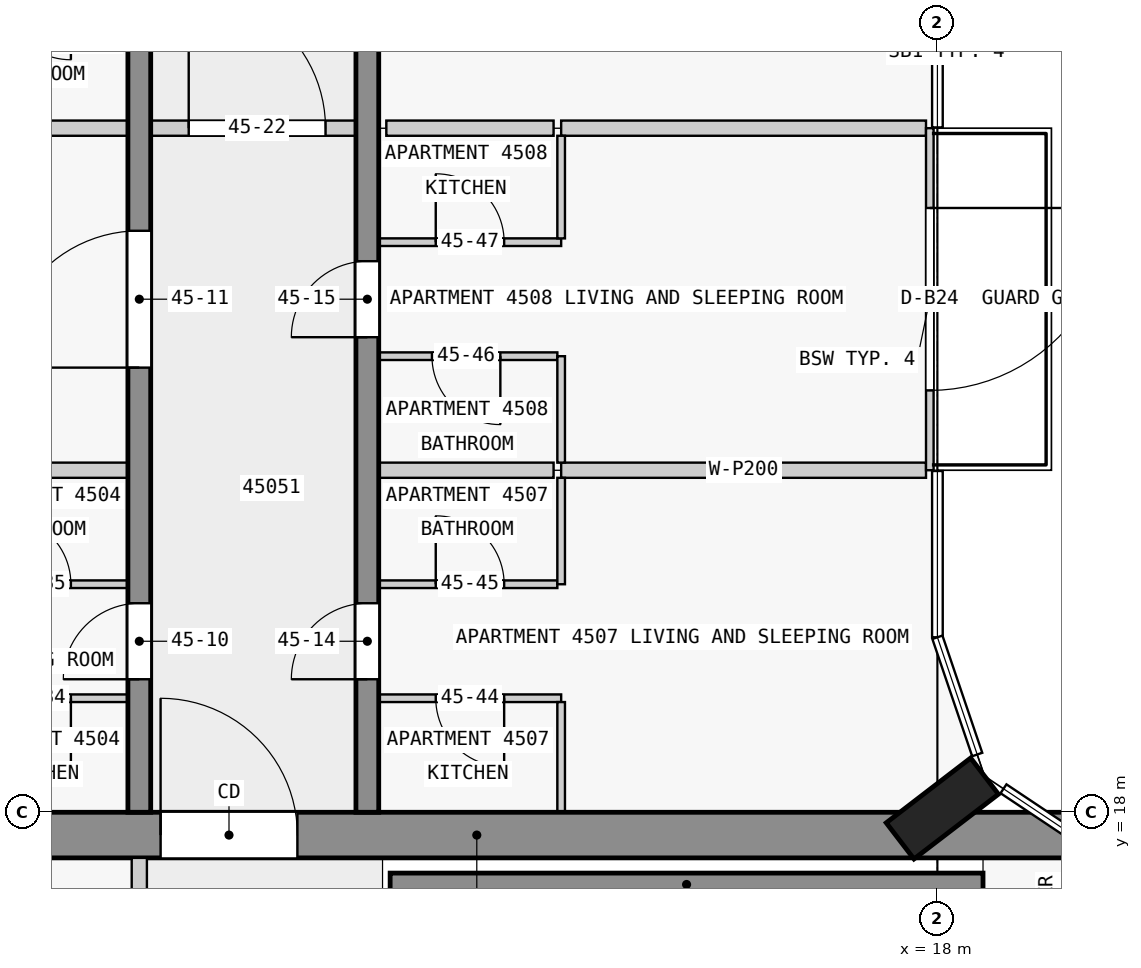
"""IFC4 building model, lengths in metres.
Left out: names, types, materials, properties, quantities, classifications, styles, units other than length and angle.
Written with IfcOpenShell. Run it as: python <this file> out.ifc"""

import sys

from ifc_helpers import new_model, si_unit, direction, frame, frame_2d, origin, origin_2d, place, context, subcontext, project, spatial, rectangle, extrude, element, fill, save


model = new_model("IFC4")
c1 = context("Model", 3, precision=1e-05, world=origin(), true_north=direction((0.0, 1.0)))
c2 = subcontext(c1, "Body", "Model", "MODEL_VIEW")
j1 = project(units=[si_unit("LENGTHUNIT", "METRE"), si_unit("PLANEANGLEUNIT", "RADIAN")], contexts=[c1])
p1 = place(None, origin())
s1 = spatial("IfcSite", under=j1, at=p1, CompositionType="ELEMENT")
p2 = place(p1, origin())
s2 = spatial("IfcBuilding", under=s1, at=p2, CompositionType="ELEMENT")
p3 = place(p2, frame((0.0, 0.0, 174.4)))
s3 = spatial("IfcBuildingStorey", under=s2, at=p3, CompositionType="ELEMENT", Elevation=174.4)
p4 = place(p3, frame((18.065, 18.05, 0.0), z_axis=(0.0, 0.0, 1.0), x_axis=(-0.608810846443, 0.793315418515, 0.0)))
e1 = element("IfcColumn", 1, at=p4, inside=s3, PredefinedType="COLUMN", context=c2, shape_type="SweptSolid", body=[
    extrude(rectangle(XDim=0.6, YDim=1.4, at=origin_2d()), origin(), (0.0, 0.0, 1.0), 3.5),
])
p5 = place(p3, frame((1.38, 17.7, 0.0), z_axis=(0.0, 0.0, 1.0), x_axis=(1.0, 0.0, 0.0)))
e2 = element("IfcWall", 2, at=p5, inside=s3, PredefinedType="SHEAR", context=c2, shape_type="SweptSolid", body=[
    extrude(rectangle(XDim=21.12, YDim=0.6, at=frame_2d((10.56, 0.0))), origin(), (0.0, 0.0, 1.0), 3.25),
])
p6 = place(p5, frame((6.4, 0.0, 0.0)))
e3 = element("IfcOpeningElement", 3, at=p6, cuts=e2, PredefinedType="OPENING", context=c2, shape_type="SweptSolid", body=[
    extrude(rectangle(XDim=1.8, YDim=2.1, at=frame_2d((0.9, 1.05))), frame((0.0, 0.31, 0.0), z_axis=(0.0, -1.0, 0.0), x_axis=(1.0, 0.0, 0.0)), (0.0, 0.0, 1.0), 0.62),
])
p7 = place(p3, frame((10.8, 17.05, 0.0), z_axis=(0.0, 0.0, 1.0), x_axis=(1.0, 0.0, 0.0)))
e4 = element("IfcWall", 4, at=p7, inside=s3, PredefinedType="SHEAR", context=c2, shape_type="SweptSolid", body=[
    extrude(rectangle(XDim=7.8, YDim=0.3, at=frame_2d((3.9, 0.0))), origin(), (0.0, 0.0, 1.0), 3.25),
])
p8 = place(p3, frame((7.5, 18.0, 0.0), z_axis=(0.0, 0.0, 1.0), x_axis=(0.0, 1.0, 0.0)))
e5 = element("IfcWall", 5, at=p8, inside=s3, PredefinedType="SHEAR", context=c2, shape_type="SweptSolid", body=[
    extrude(rectangle(XDim=27.0, YDim=0.3, at=frame_2d((13.5, 0.0))), origin(), (0.0, 0.0, 1.0), 3.25),
])
p9 = place(p8, frame((1.75, 0.0, 0.0)))
e6 = element("IfcOpeningElement", 6, at=p9, cuts=e5, PredefinedType="OPENING", context=c2, shape_type="SweptSolid", body=[
    extrude(rectangle(XDim=1.0, YDim=2.1, at=frame_2d((0.5, 1.05))), frame((0.0, 0.16, 0.0), z_axis=(0.0, -1.0, 0.0), x_axis=(1.0, 0.0, 0.0)), (0.0, 0.0, 1.0), 0.32),
])
p10 = place(p8, frame((5.85, 0.0, 0.0)))
e7 = element("IfcOpeningElement", 7, at=p10, cuts=e5, PredefinedType="OPENING", context=c2, shape_type="SweptSolid", body=[
    extrude(rectangle(XDim=1.8, YDim=2.1, at=frame_2d((0.9, 1.05))), frame((0.0, 0.16, 0.0), z_axis=(0.0, -1.0, 0.0), x_axis=(1.0, 0.0, 0.0)), (0.0, 0.0, 1.0), 0.32),
])
p11 = place(p8, frame((13.05, 0.0, 0.0)))
e8 = element("IfcOpeningElement", 8, at=p11, cuts=e5, PredefinedType="OPENING", context=c2, shape_type="SweptSolid", body=[
    extrude(rectangle(XDim=1.0, YDim=2.1, at=frame_2d((0.5, 1.05))), frame((0.0, 0.16, 0.0), z_axis=(0.0, -1.0, 0.0), x_axis=(1.0, 0.0, 0.0)), (0.0, 0.0, 1.0), 0.32),
])
p12 = place(p8, frame((21.35, 0.0, 0.0)))
e9 = element("IfcOpeningElement", 9, at=p12, cuts=e5, PredefinedType="OPENING", context=c2, shape_type="SweptSolid", body=[
    extrude(rectangle(XDim=1.0, YDim=2.1, at=frame_2d((0.5, 1.05))), frame((0.0, 0.16, 0.0), z_axis=(0.0, -1.0, 0.0), x_axis=(1.0, 0.0, 0.0)), (0.0, 0.0, 1.0), 0.32),
])
p13 = place(p3, frame((10.5, 18.0, 0.0), z_axis=(0.0, 0.0, 1.0), x_axis=(0.0, 1.0, 0.0)))
e10 = element("IfcWall", 10, at=p13, inside=s3, PredefinedType="SHEAR", context=c2, shape_type="SweptSolid", body=[
    extrude(rectangle(XDim=27.0, YDim=0.3, at=frame_2d((13.5, 0.0))), origin(), (0.0, 0.0, 1.0), 3.25),
])
p14 = place(p13, frame((1.75, 0.0, 0.0)))
e11 = element("IfcOpeningElement", 11, at=p14, cuts=e10, PredefinedType="OPENING", context=c2, shape_type="SweptSolid", body=[
    extrude(rectangle(XDim=1.0, YDim=2.1, at=frame_2d((0.5, 1.05))), frame((0.0, 0.16, 0.0), z_axis=(0.0, -1.0, 0.0), x_axis=(1.0, 0.0, 0.0)), (0.0, 0.0, 1.0), 0.32),
])
p15 = place(p13, frame((6.25, 0.0, 0.0)))
e12 = element("IfcOpeningElement", 12, at=p15, cuts=e10, PredefinedType="OPENING", context=c2, shape_type="SweptSolid", body=[
    extrude(rectangle(XDim=1.0, YDim=2.1, at=frame_2d((0.5, 1.05))), frame((0.0, 0.16, 0.0), z_axis=(0.0, -1.0, 0.0), x_axis=(1.0, 0.0, 0.0)), (0.0, 0.0, 1.0), 0.32),
])
p16 = place(p13, frame((10.75, 0.0, 0.0)))
e13 = element("IfcOpeningElement", 13, at=p16, cuts=e10, PredefinedType="OPENING", context=c2, shape_type="SweptSolid", body=[
    extrude(rectangle(XDim=1.0, YDim=2.1, at=frame_2d((0.5, 1.05))), frame((0.0, 0.16, 0.0), z_axis=(0.0, -1.0, 0.0), x_axis=(1.0, 0.0, 0.0)), (0.0, 0.0, 1.0), 0.32),
])
p17 = place(p13, frame((15.25, 0.0, 0.0)))
e14 = element("IfcOpeningElement", 14, at=p17, cuts=e10, PredefinedType="OPENING", context=c2, shape_type="SweptSolid", body=[
    extrude(rectangle(XDim=1.0, YDim=2.1, at=frame_2d((0.5, 1.05))), frame((0.0, 0.16, 0.0), z_axis=(0.0, -1.0, 0.0), x_axis=(1.0, 0.0, 0.0)), (0.0, 0.0, 1.0), 0.32),
])
p18 = place(p13, frame((19.75, 0.0, 0.0)))
e15 = element("IfcOpeningElement", 15, at=p18, cuts=e10, PredefinedType="OPENING", context=c2, shape_type="SweptSolid", body=[
    extrude(rectangle(XDim=1.0, YDim=2.1, at=frame_2d((0.5, 1.05))), frame((0.0, 0.16, 0.0), z_axis=(0.0, -1.0, 0.0), x_axis=(1.0, 0.0, 0.0)), (0.0, 0.0, 1.0), 0.32),
])
p19 = place(p13, frame((23.25, 0.0, 0.0)))
e16 = element("IfcOpeningElement", 16, at=p19, cuts=e10, PredefinedType="OPENING", context=c2, shape_type="SweptSolid", body=[
    extrude(rectangle(XDim=0.9, YDim=2.1, at=frame_2d((0.45, 1.05))), frame((0.0, 0.16, 0.0), z_axis=(0.0, -1.0, 0.0), x_axis=(1.0, 0.0, 0.0)), (0.0, 0.0, 1.0), 0.32),
])
p20 = place(p13, frame((25.45, 0.0, 0.0)))
e17 = element("IfcOpeningElement", 17, at=p20, cuts=e10, PredefinedType="OPENING", context=c2, shape_type="SweptSolid", body=[
    extrude(rectangle(XDim=1.0, YDim=2.1, at=frame_2d((0.5, 1.05))), frame((0.0, 0.16, 0.0), z_axis=(0.0, -1.0, 0.0), x_axis=(1.0, 0.0, 0.0)), (0.0, 0.0, 1.0), 0.32),
])
p21 = place(p3, frame((17.9, 27.0, 0.0), z_axis=(0.0, 0.0, 1.0), x_axis=(0.0, -1.0, 0.0)))
e18 = element("IfcWall", 18, at=p21, inside=s3, PredefinedType="STANDARD", context=c2, shape_type="SweptSolid", body=[
    extrude(rectangle(XDim=4.5, YDim=0.1, at=frame_2d((2.25, 0.0))), origin(), (0.0, 0.0, 1.0), 3.25),
])
p22 = place(p21, frame((1.05, 0.0, 0.0)))
e19 = element("IfcOpeningElement", 19, at=p22, cuts=e18, PredefinedType="OPENING", context=c2, shape_type="SweptSolid", body=[
    extrude(rectangle(XDim=2.4, YDim=2.4, at=frame_2d((1.2, 1.2))), frame((0.0, 0.06, 0.0), z_axis=(0.0, -1.0, 0.0), x_axis=(1.0, 0.0, 0.0)), (0.0, 0.0, 1.0), 0.12),
])
p23 = place(p3, frame((7.5, 10.1, 0.0), z_axis=(0.0, 0.0, 1.0), x_axis=(0.0, 1.0, 0.0)))
e20 = element("IfcWall", 20, at=p23, inside=s3, PredefinedType="PARTITIONING", context=c2, shape_type="SweptSolid", body=[
    extrude(rectangle(XDim=7.3, YDim=0.2, at=frame_2d((3.65, 0.0))), origin(), (0.0, 0.0, 1.0), 3.25),
])
p24 = place(p23, frame((0.775, 0.0, 0.0)))
e21 = element("IfcOpeningElement", 21, at=p24, cuts=e20, PredefinedType="OPENING", context=c2, shape_type="SweptSolid", body=[
    extrude(rectangle(XDim=0.9, YDim=2.1, at=frame_2d((0.45, 1.05))), frame((0.0, 0.11, 0.0), z_axis=(0.0, -1.0, 0.0), x_axis=(1.0, 0.0, 0.0)), (0.0, 0.0, 1.0), 0.22),
])
p25 = place(p23, frame((3.225, 0.0, 0.0)))
e22 = element("IfcOpeningElement", 22, at=p25, cuts=e20, PredefinedType="OPENING", context=c2, shape_type="SweptSolid", body=[
    extrude(rectangle(XDim=0.9, YDim=2.1, at=frame_2d((0.45, 1.05))), frame((0.0, 0.11, 0.0), z_axis=(0.0, -1.0, 0.0), x_axis=(1.0, 0.0, 0.0)), (0.0, 0.0, 1.0), 0.22),
])
p26 = place(p23, frame((5.25, 0.0, 0.0)))
e23 = element("IfcOpeningElement", 23, at=p26, cuts=e20, PredefinedType="OPENING", context=c2, shape_type="SweptSolid", body=[
    extrude(rectangle(XDim=0.9, YDim=2.1, at=frame_2d((0.45, 1.05))), frame((0.0, 0.11, 0.0), z_axis=(0.0, -1.0, 0.0), x_axis=(1.0, 0.0, 0.0)), (0.0, 0.0, 1.0), 0.22),
])
p27 = place(p3, frame((7.35, 19.5, 0.0), z_axis=(0.0, 0.0, 1.0), x_axis=(-1.0, 0.0, 0.0)))
e24 = element("IfcWall", 24, at=p27, inside=s3, PredefinedType="PARTITIONING", context=c2, shape_type="SweptSolid", body=[
    extrude(rectangle(XDim=2.4, YDim=0.1, at=frame_2d((1.2, 0.0))), origin(), (0.0, 0.0, 1.0), 3.25),
])
p28 = place(p27, frame((0.75, 0.0, 0.0)))
e25 = element("IfcOpeningElement", 25, at=p28, cuts=e24, PredefinedType="OPENING", context=c2, shape_type="SweptSolid", body=[
    extrude(rectangle(XDim=0.9, YDim=2.1, at=frame_2d((0.45, 1.05))), frame((0.0, 0.06, 0.0), z_axis=(0.0, -1.0, 0.0), x_axis=(1.0, 0.0, 0.0)), (0.0, 0.0, 1.0), 0.12),
])
p29 = place(p3, frame((13.05, 19.5, 0.0), z_axis=(0.0, 0.0, 1.0), x_axis=(-1.0, 0.0, 0.0)))
e26 = element("IfcWall", 26, at=p29, inside=s3, PredefinedType="PARTITIONING", context=c2, shape_type="SweptSolid", body=[
    extrude(rectangle(XDim=2.4, YDim=0.1, at=frame_2d((1.2, 0.0))), origin(), (0.0, 0.0, 1.0), 3.25),
])
p30 = place(p29, frame((0.75, 0.0, 0.0)))
e27 = element("IfcOpeningElement", 27, at=p30, cuts=e26, PredefinedType="OPENING", context=c2, shape_type="SweptSolid", body=[
    extrude(rectangle(XDim=0.9, YDim=2.1, at=frame_2d((0.45, 1.05))), frame((0.0, 0.06, 0.0), z_axis=(0.0, -1.0, 0.0), x_axis=(1.0, 0.0, 0.0)), (0.0, 0.0, 1.0), 0.12),
])
p31 = place(p3, frame((4.95, 21.0, 0.0), z_axis=(0.0, 0.0, 1.0), x_axis=(1.0, 0.0, 0.0)))
e28 = element("IfcWall", 28, at=p31, inside=s3, PredefinedType="PARTITIONING", context=c2, shape_type="SweptSolid", body=[
    extrude(rectangle(XDim=2.4, YDim=0.1, at=frame_2d((1.2, 0.0))), origin(), (0.0, 0.0, 1.0), 3.25),
])
p32 = place(p31, frame((0.75, 0.0, 0.0)))
e29 = element("IfcOpeningElement", 29, at=p32, cuts=e28, PredefinedType="OPENING", context=c2, shape_type="SweptSolid", body=[
    extrude(rectangle(XDim=0.9, YDim=2.1, at=frame_2d((0.45, 1.05))), frame((0.0, 0.06, 0.0), z_axis=(0.0, -1.0, 0.0), x_axis=(1.0, 0.0, 0.0)), (0.0, 0.0, 1.0), 0.12),
])
p33 = place(p3, frame((10.65, 21.0, 0.0), z_axis=(0.0, 0.0, 1.0), x_axis=(1.0, 0.0, 0.0)))
e30 = element("IfcWall", 30, at=p33, inside=s3, PredefinedType="PARTITIONING", context=c2, shape_type="SweptSolid", body=[
    extrude(rectangle(XDim=2.35, YDim=0.1, at=frame_2d((1.175, 0.0))), origin(), (0.0, 0.0, 1.0), 3.25),
])
p34 = place(p33, frame((0.75, 0.0, 0.0)))
e31 = element("IfcOpeningElement", 31, at=p34, cuts=e30, PredefinedType="OPENING", context=c2, shape_type="SweptSolid", body=[
    extrude(rectangle(XDim=0.9, YDim=2.1, at=frame_2d((0.45, 1.05))), frame((0.0, 0.06, 0.0), z_axis=(0.0, -1.0, 0.0), x_axis=(1.0, 0.0, 0.0)), (0.0, 0.0, 1.0), 0.12),
])
for number, where, z_axis, x_axis in (
    (32, (7.35, 22.5, 0.0), (0.0, 0.0, 1.0), (-1.0, 0.0, 0.0)),
    (33, (12.95, 22.5, 0.0), (0.0, 0.0, 1.0), (-1.0, 0.0, 0.0)),
):
    element("IfcWall", number, at=place(p3, frame(where, z_axis=z_axis, x_axis=x_axis)), inside=s3, PredefinedType="PARTITIONING", context=c2, shape_type="SweptSolid", body=[
        extrude(rectangle(XDim=2.3, YDim=0.2, at=frame_2d((1.15, 0.0))), origin(), (0.0, 0.0, 1.0), 3.25),
    ])
p35 = place(p3, frame((13.05, 22.5, 0.0), z_axis=(0.0, 0.0, 1.0), x_axis=(1.0, 0.0, 0.0)))
e34 = element("IfcWall", 34, at=p35, inside=s3, PredefinedType="PARTITIONING", context=c2, shape_type="SweptSolid", body=[
    extrude(rectangle(XDim=4.8, YDim=0.2, at=frame_2d((2.4, 0.0))), origin(), (0.0, 0.0, 1.0), 3.25),
])
p36 = place(p3, frame((13.0, 24.0, 0.0), z_axis=(0.0, 0.0, 1.0), x_axis=(-1.0, 0.0, 0.0)))
e35 = element("IfcWall", 35, at=p36, inside=s3, PredefinedType="PARTITIONING", context=c2, shape_type="SweptSolid", body=[
    extrude(rectangle(XDim=2.35, YDim=0.1, at=frame_2d((1.175, 0.0))), origin(), (0.0, 0.0, 1.0), 3.25),
])
p37 = place(p36, frame((0.75, 0.0, 0.0)))
e36 = element("IfcOpeningElement", 36, at=p37, cuts=e35, PredefinedType="OPENING", context=c2, shape_type="SweptSolid", body=[
    extrude(rectangle(XDim=0.9, YDim=2.1, at=frame_2d((0.45, 1.05))), frame((0.0, 0.06, 0.0), z_axis=(0.0, -1.0, 0.0), x_axis=(1.0, 0.0, 0.0)), (0.0, 0.0, 1.0), 0.12),
])
p38 = place(p3, frame((10.65, 25.5, 0.0), z_axis=(0.0, 0.0, 1.0), x_axis=(1.0, 0.0, 0.0)))
e37 = element("IfcWall", 37, at=p38, inside=s3, PredefinedType="PARTITIONING", context=c2, shape_type="SweptSolid", body=[
    extrude(rectangle(XDim=2.4, YDim=0.1, at=frame_2d((1.2, 0.0))), origin(), (0.0, 0.0, 1.0), 3.25),
])
p39 = place(p38, frame((0.75, 0.0, 0.0)))
e38 = element("IfcOpeningElement", 38, at=p39, cuts=e37, PredefinedType="OPENING", context=c2, shape_type="SweptSolid", body=[
    extrude(rectangle(XDim=0.9, YDim=2.1, at=frame_2d((0.45, 1.05))), frame((0.0, 0.06, 0.0), z_axis=(0.0, -1.0, 0.0), x_axis=(1.0, 0.0, 0.0)), (0.0, 0.0, 1.0), 0.12),
])
p40 = place(p3, frame((7.35, 27.0, 0.0), z_axis=(0.0, 0.0, 1.0), x_axis=(-1.0, 0.0, 0.0)))
e39 = element("IfcWall", 39, at=p40, inside=s3, PredefinedType="PARTITIONING", context=c2, shape_type="SweptSolid", body=[
    extrude(rectangle(XDim=7.43, YDim=0.2, at=frame_2d((3.715, 0.0))), origin(), (0.0, 0.0, 1.0), 3.25),
])
p41 = place(p3, frame((12.95, 27.0, 0.0), z_axis=(0.0, 0.0, 1.0), x_axis=(-1.0, 0.0, 0.0)))
e40 = element("IfcWall", 40, at=p41, inside=s3, PredefinedType="PARTITIONING", context=c2, shape_type="SweptSolid", body=[
    extrude(rectangle(XDim=2.2, YDim=0.2, at=frame_2d((1.1, 0.0))), origin(), (0.0, 0.0, 1.0), 3.25),
])
p42 = place(p3, frame((13.05, 27.0, 0.0), z_axis=(0.0, 0.0, 1.0), x_axis=(1.0, 0.0, 0.0)))
e41 = element("IfcWall", 41, at=p42, inside=s3, PredefinedType="PARTITIONING", context=c2, shape_type="SweptSolid", body=[
    extrude(rectangle(XDim=4.8, YDim=0.2, at=frame_2d((2.4, 0.0))), origin(), (0.0, 0.0, 1.0), 3.25),
])
p43 = place(p3, frame((13.05, 18.0, 0.0), z_axis=(0.0, 0.0, 1.0), x_axis=(0.0, 1.0, 0.0)))
e42 = element("IfcWall", 42, at=p43, inside=s3, PredefinedType="PARTITIONING", context=c2, shape_type="SweptSolid", body=[
    extrude(rectangle(XDim=1.45, YDim=0.1, at=frame_2d((0.725, 0.0))), origin(), (0.0, 0.0, 1.0), 3.25),
])
for number, where, z_axis, x_axis in (
    (43, (13.05, 21.0, 0.0), (0.0, 0.0, 1.0), (0.0, 1.0, 0.0)),
    (44, (13.05, 22.6, 0.0), (0.0, 0.0, 1.0), (0.0, 1.0, 0.0)),
):
    element("IfcWall", number, at=place(p3, frame(where, z_axis=z_axis, x_axis=x_axis)), inside=s3, PredefinedType="PARTITIONING", context=c2, shape_type="SweptSolid", body=[
        extrude(rectangle(XDim=1.4, YDim=0.1, at=frame_2d((0.7, 0.0))), origin(), (0.0, 0.0, 1.0), 3.25),
    ])
p44 = place(p3, frame((13.05, 25.55, 0.0), z_axis=(0.0, 0.0, 1.0), x_axis=(0.0, 1.0, 0.0)))
e45 = element("IfcWall", 45, at=p44, inside=s3, PredefinedType="PARTITIONING", context=c2, shape_type="SweptSolid", body=[
    extrude(rectangle(XDim=1.35, YDim=0.1, at=frame_2d((0.675, 0.0))), origin(), (0.0, 0.0, 1.0), 3.25),
])
p45 = place(p3, frame((7.45, 27.0, 0.0), z_axis=(0.0, 0.0, 1.0), x_axis=(1.0, 0.0, 0.0)))
e46 = element("IfcWall", 46, at=p45, inside=s3, PredefinedType="PARTITIONING", context=c2, shape_type="SweptSolid", body=[
    extrude(rectangle(XDim=3.2, YDim=0.2, at=frame_2d((1.6, 0.0))), origin(), (0.0, 0.0, 1.0), 3.25),
])
p46 = place(p45, frame((0.7, 0.0, 0.0)))
e47 = element("IfcOpeningElement", 47, at=p46, cuts=e46, PredefinedType="OPENING", context=c2, shape_type="SweptSolid", body=[
    extrude(rectangle(XDim=1.8, YDim=2.1, at=frame_2d((0.9, 1.05))), frame((0.0, 0.11, 0.0), z_axis=(0.0, -1.0, 0.0), x_axis=(1.0, 0.0, 0.0)), (0.0, 0.0, 1.0), 0.22),
])
p47 = place(p22, origin())
e48 = element("IfcDoor", 48, at=p47, inside=s3, OperationType="SINGLE_SWING_LEFT", PredefinedType="DOOR", context=c2, shape_type="SweptSolid", body=[
    extrude(rectangle(XDim=2.4, YDim=2.4, at=frame_2d((1.2, 1.2))), frame((0.0, 0.025, 0.0), z_axis=(0.0, -1.0, 0.0), x_axis=(1.0, 0.0, 0.0)), (0.0, 0.0, 1.0), 0.05),
])
fill(e19, e48)
p48 = place(p6, origin())
e49 = element("IfcDoor", 49, at=p48, inside=s3, OperationType="DOUBLE_DOOR_SINGLE_SWING", PredefinedType="DOOR", context=c2, shape_type="SweptSolid", body=[
    extrude(rectangle(XDim=1.8, YDim=2.1, at=frame_2d((0.9, 1.05))), frame((0.0, 0.025, 0.0), z_axis=(0.0, -1.0, 0.0), x_axis=(1.0, 0.0, 0.0)), (0.0, 0.0, 1.0), 0.05),
])
fill(e3, e49)
p49 = place(p9, origin())
e50 = element("IfcDoor", 50, at=p49, inside=s3, OperationType="SINGLE_SWING_LEFT", PredefinedType="DOOR", context=c2, shape_type="SweptSolid", body=[
    extrude(rectangle(XDim=1.0, YDim=2.1, at=frame_2d((0.5, 1.05))), frame((0.0, 0.025, 0.0), z_axis=(0.0, -1.0, 0.0), x_axis=(1.0, 0.0, 0.0)), (0.0, 0.0, 1.0), 0.05),
])
fill(e6, e50)
p50 = place(p10, origin())
e51 = element("IfcDoor", 51, at=p50, inside=s3, OperationType="SINGLE_SWING_LEFT", PredefinedType="DOOR", context=c2, shape_type="SweptSolid", body=[
    extrude(rectangle(XDim=1.8, YDim=2.1, at=frame_2d((0.9, 1.05))), frame((0.0, 0.025, 0.0), z_axis=(0.0, -1.0, 0.0), x_axis=(1.0, 0.0, 0.0)), (0.0, 0.0, 1.0), 0.05),
])
fill(e7, e51)
p51 = place(p14, origin())
e52 = element("IfcDoor", 52, at=p51, inside=s3, OperationType="SINGLE_SWING_LEFT", PredefinedType="DOOR", context=c2, shape_type="SweptSolid", body=[
    extrude(rectangle(XDim=1.0, YDim=2.1, at=frame_2d((0.5, 1.05))), frame((0.0, 0.025, 0.0), z_axis=(0.0, -1.0, 0.0), x_axis=(1.0, 0.0, 0.0)), (0.0, 0.0, 1.0), 0.05),
])
fill(e11, e52)
p52 = place(p15, origin())
e53 = element("IfcDoor", 53, at=p52, inside=s3, OperationType="SINGLE_SWING_LEFT", PredefinedType="DOOR", context=c2, shape_type="SweptSolid", body=[
    extrude(rectangle(XDim=1.0, YDim=2.1, at=frame_2d((0.5, 1.05))), frame((0.0, 0.025, 0.0), z_axis=(0.0, -1.0, 0.0), x_axis=(1.0, 0.0, 0.0)), (0.0, 0.0, 1.0), 0.05),
])
fill(e12, e53)
p53 = place(p46, origin())
e54 = element("IfcDoor", 54, at=p53, inside=s3, OperationType="SINGLE_SWING_LEFT", PredefinedType="DOOR", context=c2, shape_type="SweptSolid", body=[
    extrude(rectangle(XDim=1.8, YDim=2.1, at=frame_2d((0.9, 1.05))), frame((0.0, 0.025, 0.0), z_axis=(0.0, -1.0, 0.0), x_axis=(1.0, 0.0, 0.0)), (0.0, 0.0, 1.0), 0.05),
])
fill(e47, e54)
p54 = place(p28, origin())
e55 = element("IfcDoor", 55, at=p54, inside=s3, OperationType="SINGLE_SWING_RIGHT", PredefinedType="DOOR", context=c2, shape_type="SweptSolid", body=[
    extrude(rectangle(XDim=0.9, YDim=2.1, at=frame_2d((0.45, 1.05))), frame((0.0, 0.025, 0.0), z_axis=(0.0, -1.0, 0.0), x_axis=(1.0, 0.0, 0.0)), (0.0, 0.0, 1.0), 0.05),
])
fill(e25, e55)
p55 = place(p32, origin())
e56 = element("IfcDoor", 56, at=p55, inside=s3, OperationType="SINGLE_SWING_RIGHT", PredefinedType="DOOR", context=c2, shape_type="SweptSolid", body=[
    extrude(rectangle(XDim=0.9, YDim=2.1, at=frame_2d((0.45, 1.05))), frame((0.0, 0.025, 0.0), z_axis=(0.0, -1.0, 0.0), x_axis=(1.0, 0.0, 0.0)), (0.0, 0.0, 1.0), 0.05),
])
fill(e29, e56)
p56 = place(p30, origin())
e57 = element("IfcDoor", 57, at=p56, inside=s3, OperationType="SINGLE_SWING_LEFT", PredefinedType="DOOR", context=c2, shape_type="SweptSolid", body=[
    extrude(rectangle(XDim=0.9, YDim=2.1, at=frame_2d((0.45, 1.05))), frame((0.0, 0.025, 0.0), z_axis=(0.0, -1.0, 0.0), x_axis=(1.0, 0.0, 0.0)), (0.0, 0.0, 1.0), 0.05),
])
fill(e27, e57)
p57 = place(p34, origin())
e58 = element("IfcDoor", 58, at=p57, inside=s3, OperationType="SINGLE_SWING_RIGHT", PredefinedType="DOOR", context=c2, shape_type="SweptSolid", body=[
    extrude(rectangle(XDim=0.9, YDim=2.1, at=frame_2d((0.45, 1.05))), frame((0.0, 0.025, 0.0), z_axis=(0.0, -1.0, 0.0), x_axis=(1.0, 0.0, 0.0)), (0.0, 0.0, 1.0), 0.05),
])
fill(e31, e58)
p58 = place(p37, origin())
e59 = element("IfcDoor", 59, at=p58, inside=s3, OperationType="SINGLE_SWING_RIGHT", PredefinedType="DOOR", context=c2, shape_type="SweptSolid", body=[
    extrude(rectangle(XDim=0.9, YDim=2.1, at=frame_2d((0.45, 1.05))), frame((0.0, 0.025, 0.0), z_axis=(0.0, -1.0, 0.0), x_axis=(1.0, 0.0, 0.0)), (0.0, 0.0, 1.0), 0.05),
])
fill(e36, e59)
p59 = place(p39, origin())
e60 = element("IfcDoor", 60, at=p59, inside=s3, OperationType="SINGLE_SWING_LEFT", PredefinedType="DOOR", context=c2, shape_type="SweptSolid", body=[
    extrude(rectangle(XDim=0.9, YDim=2.1, at=frame_2d((0.45, 1.05))), frame((0.0, 0.025, 0.0), z_axis=(0.0, -1.0, 0.0), x_axis=(1.0, 0.0, 0.0)), (0.0, 0.0, 1.0), 0.05),
])
fill(e38, e60)
save(model, sys.argv[1])
